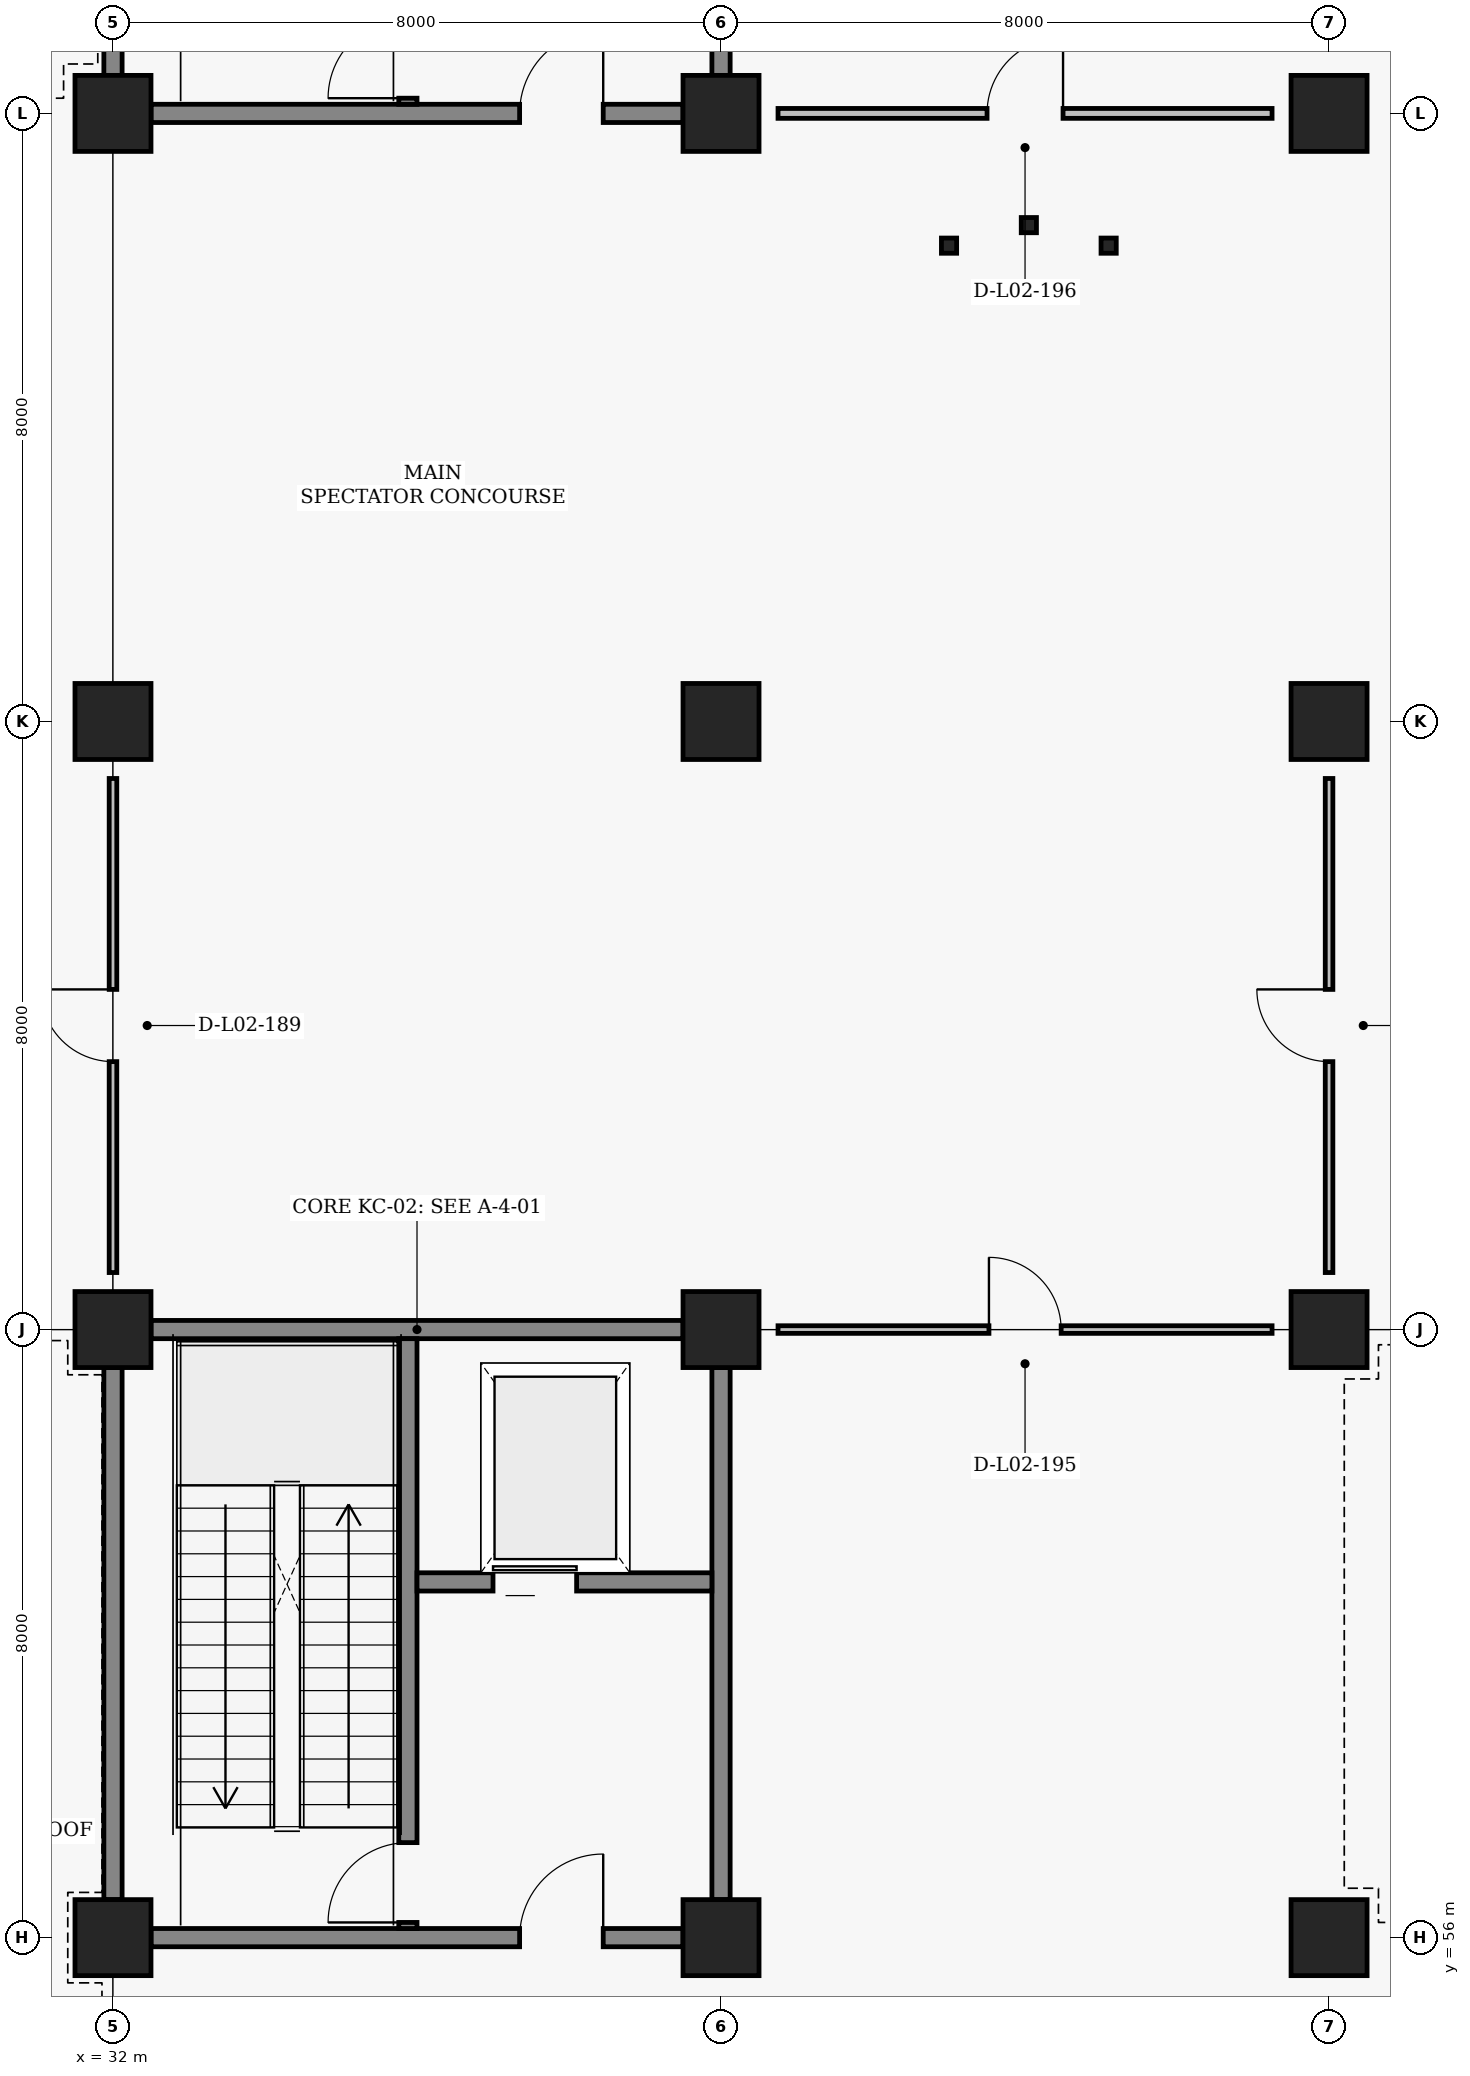
"""IFC4 building model, lengths in metres.
Left out: names, types, materials, properties, quantities, classifications, styles, units other than length and angle.
Written with IfcOpenShell. Run it as: python <this file> out.ifc"""

import sys

from ifc_helpers import new_model, si_unit, direction, frame, frame_2d, origin, origin_2d, place, context, subcontext, project, spatial, rectangle, hollow_rectangle, extrude, element, fill, save


model = new_model("IFC4")
c1 = context("Model", 3, precision=1e-05, world=origin(), true_north=direction((0.0, 1.0)))
c2 = subcontext(c1, "Body", "Model", "MODEL_VIEW")
j1 = project(units=[si_unit("LENGTHUNIT", "METRE"), si_unit("PLANEANGLEUNIT", "RADIAN")], contexts=[c1])
p1 = place(None, origin())
s1 = spatial("IfcSite", under=j1, at=p1, CompositionType="ELEMENT")
p2 = place(p1, origin())
s2 = spatial("IfcBuilding", under=s1, at=p2, CompositionType="ELEMENT")
p3 = place(p2, frame((0.0, 0.0, 4.8)))
s3 = spatial("IfcBuildingStorey", under=s2, at=p3, CompositionType="ELEMENT", Elevation=4.8)
for number, where, z_axis, x_axis in (
    (1, (32.0, 56.0, 0.0), (0.0, 0.0, 1.0), (1.0, 0.0, 0.0)),
    (2, (32.0, 64.0, 0.0), (0.0, 0.0, 1.0), (1.0, 0.0, 0.0)),
    (3, (32.0, 72.0, 0.0), (0.0, 0.0, 1.0), (1.0, 0.0, 0.0)),
    (4, (32.0, 80.0, 0.0), (0.0, 0.0, 1.0), (1.0, 0.0, 0.0)),
    (5, (40.0, 56.0, 0.0), (0.0, 0.0, 1.0), (1.0, 0.0, 0.0)),
    (6, (40.0, 64.0, 0.0), (0.0, 0.0, 1.0), (1.0, 0.0, 0.0)),
    (7, (40.0, 72.0, 0.0), (0.0, 0.0, 1.0), (1.0, 0.0, 0.0)),
    (8, (40.0, 80.0, 0.0), (0.0, 0.0, 1.0), (1.0, 0.0, 0.0)),
    (9, (48.0, 56.0, 0.0), (0.0, 0.0, 1.0), (1.0, 0.0, 0.0)),
    (10, (48.0, 64.0, 0.0), (0.0, 0.0, 1.0), (1.0, 0.0, 0.0)),
    (11, (48.0, 72.0, 0.0), (0.0, 0.0, 1.0), (1.0, 0.0, 0.0)),
    (12, (48.0, 80.0, 0.0), (0.0, 0.0, 1.0), (1.0, 0.0, 0.0)),
):
    element("IfcColumn", number, at=place(p3, frame(where, z_axis=z_axis, x_axis=x_axis)), inside=s3, PredefinedType="COLUMN", context=c2, shape_type="SweptSolid", body=[
        extrude(rectangle(XDim=1.0, YDim=1.0, at=origin_2d()), origin(), (0.0, 0.0, 1.0), 4.8),
    ])
p4 = place(p3, frame((32.5, 56.0, 0.0), z_axis=(0.0, 0.0, 1.0), x_axis=(1.0, 0.0, 0.0)))
e13 = element("IfcWall", 13, at=p4, inside=s3, PredefinedType="SHEAR", context=c2, shape_type="SweptSolid", body=[
    extrude(rectangle(XDim=7.0, YDim=0.24, at=frame_2d((3.5, 0.0))), origin(), (0.0, 0.0, 1.0), 3.61),
])
p5 = place(p4, frame((4.85, 0.0, 0.0)))
e14 = element("IfcOpeningElement", 14, at=p5, cuts=e13, PredefinedType="OPENING", context=c2, shape_type="SweptSolid", body=[
    extrude(rectangle(XDim=1.1, YDim=2.2, at=frame_2d((0.55, 1.1))), frame((0.0, 0.13, 0.0), z_axis=(0.0, -1.0, 0.0), x_axis=(1.0, 0.0, 0.0)), (0.0, 0.0, 1.0), 0.26),
])
for number, where, z_axis, x_axis in (
    (15, (32.5, 64.0, 0.0), (0.0, 0.0, 1.0), (1.0, 0.0, 0.0)),
    (16, (32.0, 56.5, 0.0), (0.0, 0.0, 1.0), (0.0, 1.0, 0.0)),
):
    element("IfcWall", number, at=place(p3, frame(where, z_axis=z_axis, x_axis=x_axis)), inside=s3, PredefinedType="SHEAR", context=c2, shape_type="SweptSolid", body=[
        extrude(rectangle(XDim=7.0, YDim=0.24, at=frame_2d((3.5, 0.0))), origin(), (0.0, 0.0, 1.0), 3.91),
    ])
p6 = place(p3, frame((40.0, 56.5, 0.0), z_axis=(0.0, 0.0, 1.0), x_axis=(0.0, 1.0, 0.0)))
e17 = element("IfcWall", 17, at=p6, inside=s3, PredefinedType="SHEAR", context=c2, shape_type="SweptSolid", body=[
    extrude(rectangle(XDim=7.0, YDim=0.24, at=frame_2d((3.5, 0.0))), origin(), (0.0, 0.0, 1.0), 3.61),
])
p7 = place(p3, frame((35.88, 56.12, 0.0), z_axis=(0.0, 0.0, 1.0), x_axis=(0.0, 1.0, 0.0)))
e18 = element("IfcWall", 18, at=p7, inside=s3, PredefinedType="SHEAR", context=c2, shape_type="SweptSolid", body=[
    extrude(rectangle(XDim=7.76, YDim=0.24, at=frame_2d((3.88, 0.0))), origin(), (0.0, 0.0, 1.0), 4.01),
])
p8 = place(p7, frame((0.08, 0.0, 0.0)))
e19 = element("IfcOpeningElement", 19, at=p8, cuts=e18, PredefinedType="OPENING", context=c2, shape_type="SweptSolid", body=[
    extrude(rectangle(XDim=1.05, YDim=2.15, at=frame_2d((0.525, 1.075))), frame((0.0, 0.13, 0.0), z_axis=(0.0, -1.0, 0.0), x_axis=(1.0, 0.0, 0.0)), (0.0, 0.0, 1.0), 0.26),
])
p9 = place(p3, frame((36.0, 60.68, 0.0), z_axis=(0.0, 0.0, 1.0), x_axis=(1.0, 0.0, 0.0)))
e20 = element("IfcWall", 20, at=p9, inside=s3, PredefinedType="SHEAR", context=c2, shape_type="SweptSolid", body=[
    extrude(rectangle(XDim=3.88, YDim=0.24, at=frame_2d((1.94, 0.0))), origin(), (0.0, 0.0, 1.0), 3.91),
])
p10 = place(p9, frame((1.0, 0.0, 0.0)))
e21 = element("IfcOpeningElement", 21, at=p10, cuts=e20, PredefinedType="OPENING", context=c2, shape_type="SweptSolid", body=[
    extrude(rectangle(XDim=1.1, YDim=2.15, at=frame_2d((0.55, 1.075))), frame((0.0, 0.13, 0.0), z_axis=(0.0, -1.0, 0.0), x_axis=(1.0, 0.0, 0.0)), (0.0, 0.0, 1.0), 0.26),
])
p11 = place(p3, frame((32.5, 80.0, 0.0), z_axis=(0.0, 0.0, 1.0), x_axis=(1.0, 0.0, 0.0)))
e22 = element("IfcWall", 22, at=p11, inside=s3, PredefinedType="SHEAR", context=c2, shape_type="SweptSolid", body=[
    extrude(rectangle(XDim=7.0, YDim=0.24, at=frame_2d((3.5, 0.0))), origin(), (0.0, 0.0, 1.0), 3.91),
])
p12 = place(p11, frame((4.85, 0.0, 0.0)))
e23 = element("IfcOpeningElement", 23, at=p12, cuts=e22, PredefinedType="OPENING", context=c2, shape_type="SweptSolid", body=[
    extrude(rectangle(XDim=1.1, YDim=2.2, at=frame_2d((0.55, 1.1))), frame((0.0, 0.13, 0.0), z_axis=(0.0, -1.0, 0.0), x_axis=(1.0, 0.0, 0.0)), (0.0, 0.0, 1.0), 0.26),
])
for number, where, z_axis, x_axis in (
    (24, (32.0, 80.5, 0.0), (0.0, 0.0, 1.0), (0.0, 1.0, 0.0)),
    (25, (40.0, 80.5, 0.0), (0.0, 0.0, 1.0), (0.0, 1.0, 0.0)),
):
    element("IfcWall", number, at=place(p3, frame(where, z_axis=z_axis, x_axis=x_axis)), inside=s3, PredefinedType="SHEAR", context=c2, shape_type="SweptSolid", body=[
        extrude(rectangle(XDim=7.0, YDim=0.24, at=frame_2d((3.5, 0.0))), origin(), (0.0, 0.0, 1.0), 3.91),
    ])
p13 = place(p3, frame((35.88, 80.12, 0.0), z_axis=(0.0, 0.0, 1.0), x_axis=(0.0, 1.0, 0.0)))
e26 = element("IfcWall", 26, at=p13, inside=s3, PredefinedType="SHEAR", context=c2, shape_type="SweptSolid", body=[
    extrude(rectangle(XDim=7.76, YDim=0.24, at=frame_2d((3.88, 0.0))), origin(), (0.0, 0.0, 1.0), 4.01),
])
p14 = place(p13, frame((0.08, 0.0, 0.0)))
e27 = element("IfcOpeningElement", 27, at=p14, cuts=e26, PredefinedType="OPENING", context=c2, shape_type="SweptSolid", body=[
    extrude(rectangle(XDim=1.05, YDim=2.15, at=frame_2d((0.525, 1.075))), frame((0.0, 0.13, 0.0), z_axis=(0.0, -1.0, 0.0), x_axis=(1.0, 0.0, 0.0)), (0.0, 0.0, 1.0), 0.26),
])
for number, where, z_axis, x_axis in (
    (28, (43.0, 78.26, 0.0), (0.0, 0.0, 1.0), (1.0, 0.0, 0.0)),
    (29, (45.1, 78.26, 0.0), (0.0, 0.0, 1.0), (1.0, 0.0, 0.0)),
    (30, (44.05, 78.53, 0.0), (0.0, 0.0, 1.0), (1.0, 0.0, 0.0)),
):
    element("IfcColumn", number, at=place(p3, frame(where, z_axis=z_axis, x_axis=x_axis)), inside=s3, PredefinedType="COLUMN", context=c2, shape_type="SweptSolid", body=[
        extrude(hollow_rectangle(XDim=0.2, YDim=0.2, WallThickness=0.009, at=origin_2d()), origin(), (0.0, 0.0, 1.0), 4.8),
    ])
p15 = place(p3, frame((32.0, 64.75, 0.0), z_axis=(0.0, 0.0, 1.0), x_axis=(0.0, 1.0, 0.0)))
e31 = element("IfcWall", 31, at=p15, inside=s3, PredefinedType="PARTITIONING", context=c2, shape_type="SweptSolid", body=[
    extrude(rectangle(XDim=6.5, YDim=0.1, at=frame_2d((3.25, 0.0))), origin(), (0.0, 0.0, 1.0), 3.91),
])
p16 = place(p15, frame((2.775, 0.0, 0.0)))
e32 = element("IfcOpeningElement", 32, at=p16, cuts=e31, PredefinedType="OPENING", context=c2, shape_type="SweptSolid", body=[
    extrude(rectangle(XDim=0.95, YDim=2.1, at=frame_2d((0.475, 1.05))), frame((0.0, 0.06, 0.0), z_axis=(0.0, -1.0, 0.0), x_axis=(1.0, 0.0, 0.0)), (0.0, 0.0, 1.0), 0.12),
])
p17 = place(p3, frame((40.75, 64.0, 0.0), z_axis=(0.0, 0.0, 1.0), x_axis=(1.0, 0.0, 0.0)))
e33 = element("IfcWall", 33, at=p17, inside=s3, PredefinedType="PARTITIONING", context=c2, shape_type="SweptSolid", body=[
    extrude(rectangle(XDim=6.5, YDim=0.1, at=frame_2d((3.25, 0.0))), origin(), (0.0, 0.0, 1.0), 3.91),
])
p18 = place(p17, frame((2.775, 0.0, 0.0)))
e34 = element("IfcOpeningElement", 34, at=p18, cuts=e33, PredefinedType="OPENING", context=c2, shape_type="SweptSolid", body=[
    extrude(rectangle(XDim=0.95, YDim=2.1, at=frame_2d((0.475, 1.05))), frame((0.0, 0.06, 0.0), z_axis=(0.0, -1.0, 0.0), x_axis=(1.0, 0.0, 0.0)), (0.0, 0.0, 1.0), 0.12),
])
p19 = place(p3, frame((40.75, 80.0, 0.0), z_axis=(0.0, 0.0, 1.0), x_axis=(1.0, 0.0, 0.0)))
e35 = element("IfcWall", 35, at=p19, inside=s3, PredefinedType="PARTITIONING", context=c2, shape_type="SweptSolid", body=[
    extrude(rectangle(XDim=6.5, YDim=0.13, at=frame_2d((3.25, 0.0))), origin(), (0.0, 0.0, 1.0), 3.91),
])
p20 = place(p19, frame((2.75, 0.0, 0.0)))
e36 = element("IfcOpeningElement", 36, at=p20, cuts=e35, PredefinedType="OPENING", context=c2, shape_type="SweptSolid", body=[
    extrude(rectangle(XDim=1.0, YDim=2.1, at=frame_2d((0.5, 1.05))), frame((0.0, 0.075, 0.0), z_axis=(0.0, -1.0, 0.0), x_axis=(1.0, 0.0, 0.0)), (0.0, 0.0, 1.0), 0.15),
])
p21 = place(p3, frame((48.0, 64.75, 0.0), z_axis=(0.0, 0.0, 1.0), x_axis=(0.0, 1.0, 0.0)))
e37 = element("IfcWall", 37, at=p21, inside=s3, PredefinedType="PARTITIONING", context=c2, shape_type="SweptSolid", body=[
    extrude(rectangle(XDim=6.5, YDim=0.1, at=frame_2d((3.25, 0.0))), origin(), (0.0, 0.0, 1.0), 3.91),
])
p22 = place(p21, frame((2.775, 0.0, 0.0)))
e38 = element("IfcOpeningElement", 38, at=p22, cuts=e37, PredefinedType="OPENING", context=c2, shape_type="SweptSolid", body=[
    extrude(rectangle(XDim=0.95, YDim=2.1, at=frame_2d((0.475, 1.05))), frame((0.0, 0.06, 0.0), z_axis=(0.0, -1.0, 0.0), x_axis=(1.0, 0.0, 0.0)), (0.0, 0.0, 1.0), 0.12),
])
p23 = place(p5, origin())
e39 = element("IfcDoor", 39, at=p23, inside=s3, OperationType="SINGLE_SWING_RIGHT", PredefinedType="DOOR", context=c2, shape_type="SweptSolid", body=[
    extrude(rectangle(XDim=1.1, YDim=2.2, at=frame_2d((0.55, 1.1))), frame((0.0, 0.025, 0.0), z_axis=(0.0, -1.0, 0.0), x_axis=(1.0, 0.0, 0.0)), (0.0, 0.0, 1.0), 0.05),
])
fill(e14, e39)
p24 = place(p8, origin())
e40 = element("IfcDoor", 40, at=p24, inside=s3, OperationType="SINGLE_SWING_LEFT", PredefinedType="DOOR", context=c2, shape_type="SweptSolid", body=[
    extrude(rectangle(XDim=1.05, YDim=2.15, at=frame_2d((0.525, 1.075))), frame((0.0, 0.025, 0.0), z_axis=(0.0, -1.0, 0.0), x_axis=(1.0, 0.0, 0.0)), (0.0, 0.0, 1.0), 0.05),
])
fill(e19, e40)
p25 = place(p10, origin())
e41 = element("IfcDoor", 41, at=p25, inside=s3, OperationType="SLIDING_TO_LEFT", PredefinedType="DOOR", context=c2, shape_type="SweptSolid", body=[
    extrude(rectangle(XDim=1.1, YDim=2.15, at=frame_2d((0.55, 1.075))), frame((0.0, 0.025, 0.0), z_axis=(0.0, -1.0, 0.0), x_axis=(1.0, 0.0, 0.0)), (0.0, 0.0, 1.0), 0.05),
])
fill(e21, e41)
p26 = place(p12, origin())
e42 = element("IfcDoor", 42, at=p26, inside=s3, OperationType="SINGLE_SWING_RIGHT", PredefinedType="DOOR", context=c2, shape_type="SweptSolid", body=[
    extrude(rectangle(XDim=1.1, YDim=2.2, at=frame_2d((0.55, 1.1))), frame((0.0, 0.025, 0.0), z_axis=(0.0, -1.0, 0.0), x_axis=(1.0, 0.0, 0.0)), (0.0, 0.0, 1.0), 0.05),
])
fill(e23, e42)
p27 = place(p14, origin())
e43 = element("IfcDoor", 43, at=p27, inside=s3, OperationType="SINGLE_SWING_LEFT", PredefinedType="DOOR", context=c2, shape_type="SweptSolid", body=[
    extrude(rectangle(XDim=1.05, YDim=2.15, at=frame_2d((0.525, 1.075))), frame((0.0, 0.025, 0.0), z_axis=(0.0, -1.0, 0.0), x_axis=(1.0, 0.0, 0.0)), (0.0, 0.0, 1.0), 0.05),
])
fill(e27, e43)
p28 = place(p16, origin())
e44 = element("IfcDoor", 44, at=p28, inside=s3, OperationType="SINGLE_SWING_RIGHT", PredefinedType="DOOR", context=c2, shape_type="SweptSolid", body=[
    extrude(rectangle(XDim=0.95, YDim=2.1, at=frame_2d((0.475, 1.05))), frame((0.0, 0.025, 0.0), z_axis=(0.0, -1.0, 0.0), x_axis=(1.0, 0.0, 0.0)), (0.0, 0.0, 1.0), 0.05),
])
fill(e32, e44)
p29 = place(p18, origin())
e45 = element("IfcDoor", 45, at=p29, inside=s3, OperationType="SINGLE_SWING_LEFT", PredefinedType="DOOR", context=c2, shape_type="SweptSolid", body=[
    extrude(rectangle(XDim=0.95, YDim=2.1, at=frame_2d((0.475, 1.05))), frame((0.0, 0.025, 0.0), z_axis=(0.0, -1.0, 0.0), x_axis=(1.0, 0.0, 0.0)), (0.0, 0.0, 1.0), 0.05),
])
fill(e34, e45)
p30 = place(p20, origin())
e46 = element("IfcDoor", 46, at=p30, inside=s3, OperationType="SINGLE_SWING_RIGHT", PredefinedType="DOOR", context=c2, shape_type="SweptSolid", body=[
    extrude(rectangle(XDim=1.0, YDim=2.1, at=frame_2d((0.5, 1.05))), frame((0.0, 0.025, 0.0), z_axis=(0.0, -1.0, 0.0), x_axis=(1.0, 0.0, 0.0)), (0.0, 0.0, 1.0), 0.05),
])
fill(e36, e46)
p31 = place(p22, origin())
e47 = element("IfcDoor", 47, at=p31, inside=s3, OperationType="SINGLE_SWING_RIGHT", PredefinedType="DOOR", context=c2, shape_type="SweptSolid", body=[
    extrude(rectangle(XDim=0.95, YDim=2.1, at=frame_2d((0.475, 1.05))), frame((0.0, 0.025, 0.0), z_axis=(0.0, -1.0, 0.0), x_axis=(1.0, 0.0, 0.0)), (0.0, 0.0, 1.0), 0.05),
])
fill(e38, e47)
save(model, sys.argv[1])
